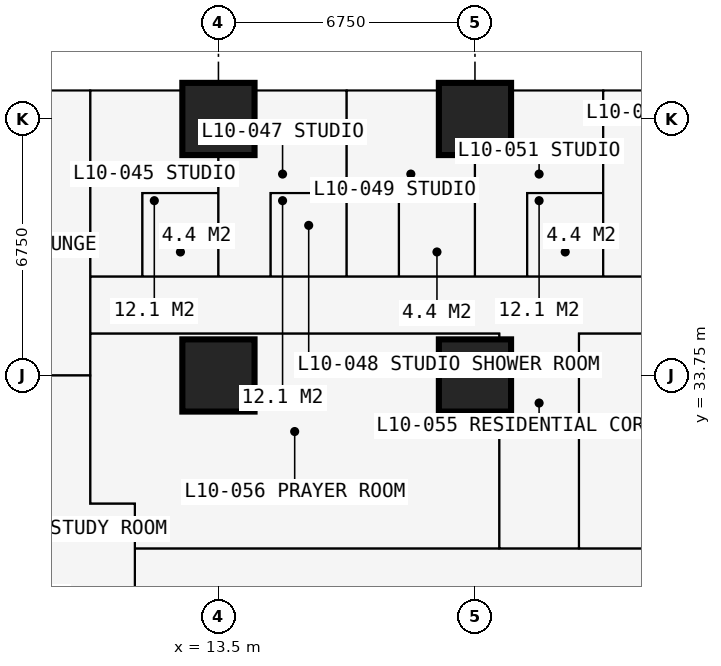
"""IFC4 building model, lengths in metres.
Left out: names, types, materials, properties, quantities, classifications, styles, units other than length and angle.
Written with IfcOpenShell. Run it as: python <this file> out.ifc"""

import sys

from ifc_helpers import new_model, si_unit, direction, frame, frame_2d, origin, origin_2d, place, context, subcontext, project, spatial, rectangle, extrude, element, fill, save


model = new_model("IFC4")
c1 = context("Model", 3, precision=1e-05, world=origin(), true_north=direction((0.0, 1.0)))
c2 = subcontext(c1, "Body", "Model", "MODEL_VIEW")
j1 = project(units=[si_unit("LENGTHUNIT", "METRE"), si_unit("PLANEANGLEUNIT", "RADIAN")], contexts=[c1])
p1 = place(None, origin())
s1 = spatial("IfcSite", under=j1, at=p1, CompositionType="ELEMENT")
p2 = place(p1, origin())
s2 = spatial("IfcBuilding", under=s1, at=p2, CompositionType="ELEMENT")
p3 = place(p2, frame((0.0, 0.0, 39.6)))
s3 = spatial("IfcBuildingStorey", under=s2, at=p3, CompositionType="ELEMENT", Elevation=39.6)
for number, where, z_axis, x_axis in (
    (1, (13.5, 33.75, 0.0), (0.0, 0.0, 1.0), (1.0, 0.0, 0.0)),
    (2, (13.5, 40.5, 0.0), (0.0, 0.0, 1.0), (1.0, 0.0, 0.0)),
    (3, (20.25, 33.75, 0.0), (0.0, 0.0, 1.0), (1.0, 0.0, 0.0)),
    (4, (20.25, 40.5, 0.0), (0.0, 0.0, 1.0), (1.0, 0.0, 0.0)),
):
    element("IfcColumn", number, at=place(p3, frame(where, z_axis=z_axis, x_axis=x_axis)), inside=s3, PredefinedType="COLUMN", context=c2, shape_type="SweptSolid", body=[
        extrude(rectangle(XDim=1.9, YDim=1.9, at=origin_2d()), origin(), (0.0, 0.0, 1.0), 3.6),
    ])
p4 = place(p3, frame((13.5, 41.25, 0.0), z_axis=(0.0, 0.0, 1.0), x_axis=(1.0, 0.0, 0.0)))
e5 = element("IfcWall", 5, at=p4, inside=s3, PredefinedType="SOLIDWALL", context=c2, shape_type="SweptSolid", body=[
    extrude(rectangle(XDim=6.75, YDim=0.15, at=frame_2d((3.375, 0.0))), origin(), (0.0, 0.0, 1.0), 3.375),
])
p5 = place(p4, frame((0.996, 0.0, 0.0)))
e6 = element("IfcOpeningElement", 6, at=p5, cuts=e5, PredefinedType="OPENING", context=c2, shape_type="SweptSolid", body=[
    extrude(rectangle(XDim=1.0, YDim=2.2, at=frame_2d((0.5, 1.1))), frame((0.0, 0.085, 0.0), z_axis=(0.0, -1.0, 0.0), x_axis=(1.0, 0.0, 0.0)), (0.0, 0.0, 1.0), 0.17),
])
p6 = place(p4, frame((2.042, 0.0, 0.9)))
e7 = element("IfcOpeningElement", 7, at=p6, cuts=e5, PredefinedType="OPENING", context=c2, shape_type="SweptSolid", body=[
    extrude(rectangle(XDim=1.2, YDim=1.8, at=frame_2d((0.6, 0.9))), frame((0.0, 0.085, 0.0), z_axis=(0.0, -1.0, 0.0), x_axis=(1.0, 0.0, 0.0)), (0.0, 0.0, 1.0), 0.17),
])
p7 = place(p4, frame((4.754, 0.0, 0.0)))
e8 = element("IfcOpeningElement", 8, at=p7, cuts=e5, PredefinedType="OPENING", context=c2, shape_type="SweptSolid", body=[
    extrude(rectangle(XDim=1.0, YDim=2.2, at=frame_2d((0.5, 1.1))), frame((0.0, 0.085, 0.0), z_axis=(0.0, -1.0, 0.0), x_axis=(1.0, 0.0, 0.0)), (0.0, 0.0, 1.0), 0.17),
])
p8 = place(p4, frame((3.508, 0.0, 0.9)))
e9 = element("IfcOpeningElement", 9, at=p8, cuts=e5, PredefinedType="OPENING", context=c2, shape_type="SweptSolid", body=[
    extrude(rectangle(XDim=1.2, YDim=1.8, at=frame_2d((0.6, 0.9))), frame((0.0, 0.085, 0.0), z_axis=(0.0, -1.0, 0.0), x_axis=(1.0, 0.0, 0.0)), (0.0, 0.0, 1.0), 0.17),
])
p9 = place(p3, frame((16.875, 41.35, 0.0), z_axis=(0.0, 0.0, 1.0), x_axis=(0.0, 1.0, 0.0)))
e10 = element("IfcWall", 10, at=p9, inside=s3, PredefinedType="USERDEFINED", context=c2, shape_type="SweptSolid", body=[
    extrude(rectangle(XDim=2.2, YDim=1.0, at=frame_2d((1.1, 0.0))), origin(), (0.0, 0.0, 1.0), 0.9),
])
p10 = place(p3, frame((4.15, 33.75, 0.0), z_axis=(0.0, 0.0, 1.0), x_axis=(1.0, 0.0, 0.0)))
e11 = element("IfcWall", 11, at=p10, inside=s3, PredefinedType="PARTITIONING", context=c2, shape_type="SweptSolid", body=[
    extrude(rectangle(XDim=5.975, YDim=0.15, at=frame_2d((2.988, 0.0))), origin(), (0.0, 0.0, 1.0), 2.877),
])
p11 = place(p3, frame((10.125, 30.375, 0.0), z_axis=(0.0, 0.0, 1.0), x_axis=(0.0, 1.0, 0.0)))
e12 = element("IfcWall", 12, at=p11, inside=s3, PredefinedType="PARTITIONING", context=c2, shape_type="SweptSolid", body=[
    extrude(rectangle(XDim=10.859, YDim=0.15, at=frame_2d((5.429, 0.0))), origin(), (0.0, 0.0, 1.0), 3.375),
])
p12 = place(p11, frame((4.725, 0.0, 0.0)))
e13 = element("IfcOpeningElement", 13, at=p12, cuts=e12, PredefinedType="OPENING", context=c2, shape_type="SweptSolid", body=[
    extrude(rectangle(XDim=1.0, YDim=2.2, at=frame_2d((0.5, 1.1))), frame((0.0, 0.085, 0.0), z_axis=(0.0, -1.0, 0.0), x_axis=(1.0, 0.0, 0.0)), (0.0, 0.0, 1.0), 0.17),
])
p13 = place(p3, frame((10.125, 30.375, 0.0), z_axis=(0.0, 0.0, 1.0), x_axis=(1.0, 0.0, 0.0)))
e14 = element("IfcWall", 14, at=p13, inside=s3, PredefinedType="PARTITIONING", context=c2, shape_type="SweptSolid", body=[
    extrude(rectangle(XDim=1.175, YDim=0.15, at=frame_2d((0.587, 0.0))), origin(), (0.0, 0.0, 1.0), 3.375),
])
p14 = place(p3, frame((10.125, 34.85, 0.0), z_axis=(0.0, 0.0, 1.0), x_axis=(1.0, 0.0, 0.0)))
e15 = element("IfcWall", 15, at=p14, inside=s3, PredefinedType="PARTITIONING", context=c2, shape_type="SweptSolid", body=[
    extrude(rectangle(XDim=10.762, YDim=0.15, at=frame_2d((5.381, 0.0))), origin(), (0.0, 0.0, 1.0), 3.375),
])
p15 = place(p14, frame((4.9, 0.0, 0.0)))
e16 = element("IfcOpeningElement", 16, at=p15, cuts=e15, PredefinedType="OPENING", context=c2, shape_type="SweptSolid", body=[
    extrude(rectangle(XDim=0.95, YDim=2.2, at=frame_2d((0.475, 1.1))), frame((0.0, 0.085, 0.0), z_axis=(0.0, -1.0, 0.0), x_axis=(1.0, 0.0, 0.0)), (0.0, 0.0, 1.0), 0.17),
])
p16 = place(p3, frame((10.125, 36.35, 0.0), z_axis=(0.0, 0.0, 1.0), x_axis=(1.0, 0.0, 0.0)))
e17 = element("IfcWall", 17, at=p16, inside=s3, PredefinedType="PARTITIONING", context=c2, shape_type="SweptSolid", body=[
    extrude(rectangle(XDim=23.625, YDim=0.1, at=frame_2d((11.812, 0.0))), origin(), (0.0, 0.0, 1.0), 3.375),
])
p17 = place(p16, frame((0.2, 0.0, 0.0)))
e18 = element("IfcOpeningElement", 18, at=p17, cuts=e17, PredefinedType="OPENING", context=c2, shape_type="SweptSolid", body=[
    extrude(rectangle(XDim=0.95, YDim=2.2, at=frame_2d((0.475, 1.1))), frame((0.0, 0.06, 0.0), z_axis=(0.0, -1.0, 0.0), x_axis=(1.0, 0.0, 0.0)), (0.0, 0.0, 1.0), 0.12),
])
p18 = place(p16, frame((3.625, 0.0, 0.0)))
e19 = element("IfcOpeningElement", 19, at=p18, cuts=e17, PredefinedType="OPENING", context=c2, shape_type="SweptSolid", body=[
    extrude(rectangle(XDim=0.95, YDim=2.2, at=frame_2d((0.475, 1.1))), frame((0.0, 0.06, 0.0), z_axis=(0.0, -1.0, 0.0), x_axis=(1.0, 0.0, 0.0)), (0.0, 0.0, 1.0), 0.12),
])
p19 = place(p16, frame((7.0, 0.0, 0.0)))
e20 = element("IfcOpeningElement", 20, at=p19, cuts=e17, PredefinedType="OPENING", context=c2, shape_type="SweptSolid", body=[
    extrude(rectangle(XDim=0.95, YDim=2.2, at=frame_2d((0.475, 1.1))), frame((0.0, 0.06, 0.0), z_axis=(0.0, -1.0, 0.0), x_axis=(1.0, 0.0, 0.0)), (0.0, 0.0, 1.0), 0.12),
])
p20 = place(p16, frame((10.375, 0.0, 0.0)))
e21 = element("IfcOpeningElement", 21, at=p20, cuts=e17, PredefinedType="OPENING", context=c2, shape_type="SweptSolid", body=[
    extrude(rectangle(XDim=0.95, YDim=2.2, at=frame_2d((0.475, 1.1))), frame((0.0, 0.06, 0.0), z_axis=(0.0, -1.0, 0.0), x_axis=(1.0, 0.0, 0.0)), (0.0, 0.0, 1.0), 0.12),
])
p21 = place(p16, frame((13.75, 0.0, 0.0)))
e22 = element("IfcOpeningElement", 22, at=p21, cuts=e17, PredefinedType="OPENING", context=c2, shape_type="SweptSolid", body=[
    extrude(rectangle(XDim=0.95, YDim=2.2, at=frame_2d((0.475, 1.1))), frame((0.0, 0.06, 0.0), z_axis=(0.0, -1.0, 0.0), x_axis=(1.0, 0.0, 0.0)), (0.0, 0.0, 1.0), 0.12),
])
p22 = place(p3, frame((11.3, 11.3, 0.0), z_axis=(0.0, 0.0, 1.0), x_axis=(0.0, 1.0, 0.0)))
e23 = element("IfcWall", 23, at=p22, inside=s3, PredefinedType="PARTITIONING", context=c2, shape_type="SweptSolid", body=[
    extrude(rectangle(XDim=19.075, YDim=0.15, at=frame_2d((9.538, 0.0))), origin(), (0.0, 0.0, 1.0), 3.375),
])
p23 = place(p22, frame((10.137, 0.0, 0.0)))
e24 = element("IfcOpeningElement", 24, at=p23, cuts=e23, PredefinedType="OPENING", context=c2, shape_type="SweptSolid", body=[
    extrude(rectangle(XDim=1.0, YDim=2.2, at=frame_2d((0.5, 1.1))), frame((0.0, 0.085, 0.0), z_axis=(0.0, -1.0, 0.0), x_axis=(1.0, 0.0, 0.0)), (0.0, 0.0, 1.0), 0.17),
])
p24 = place(p3, frame((11.3, 29.2, 0.0), z_axis=(0.0, 0.0, 1.0), x_axis=(1.0, 0.0, 0.0)))
e25 = element("IfcWall", 25, at=p24, inside=s3, PredefinedType="PARTITIONING", context=c2, shape_type="SweptSolid", body=[
    extrude(rectangle(XDim=19.075, YDim=0.15, at=frame_2d((9.538, 0.0))), origin(), (0.0, 0.0, 1.0), 3.375),
])
p25 = place(p24, frame((10.137, 0.0, 0.0)))
e26 = element("IfcOpeningElement", 26, at=p25, cuts=e25, PredefinedType="OPENING", context=c2, shape_type="SweptSolid", body=[
    extrude(rectangle(XDim=1.0, YDim=2.2, at=frame_2d((0.5, 1.1))), frame((0.0, 0.085, 0.0), z_axis=(0.0, -1.0, 0.0), x_axis=(1.0, 0.0, 0.0)), (0.0, 0.0, 1.0), 0.17),
])
p26 = place(p3, frame((11.5, 36.35, 0.0), z_axis=(0.0, 0.0, 1.0), x_axis=(0.0, 1.0, 0.0)))
e27 = element("IfcWall", 27, at=p26, inside=s3, PredefinedType="PARTITIONING", context=c2, shape_type="SweptSolid", body=[
    extrude(rectangle(XDim=2.2, YDim=0.1, at=frame_2d((1.1, 0.0))), origin(), (0.0, 0.0, 1.0), 3.375),
])
p27 = place(p26, frame((0.65, 0.0, 0.0)))
e28 = element("IfcOpeningElement", 28, at=p27, cuts=e27, PredefinedType="OPENING", context=c2, shape_type="SweptSolid", body=[
    extrude(rectangle(XDim=0.9, YDim=2.2, at=frame_2d((0.45, 1.1))), frame((0.0, 0.06, 0.0), z_axis=(0.0, -1.0, 0.0), x_axis=(1.0, 0.0, 0.0)), (0.0, 0.0, 1.0), 0.12),
])
p28 = place(p3, frame((11.5, 38.55, 0.0), z_axis=(0.0, 0.0, 1.0), x_axis=(1.0, 0.0, 0.0)))
e29 = element("IfcWall", 29, at=p28, inside=s3, PredefinedType="PARTITIONING", context=c2, shape_type="SweptSolid", body=[
    extrude(rectangle(XDim=2.0, YDim=0.1, at=frame_2d((1.0, 0.0))), origin(), (0.0, 0.0, 1.0), 3.375),
])
p29 = place(p3, frame((13.5, 36.35, 0.0), z_axis=(0.0, 0.0, 1.0), x_axis=(0.0, 1.0, 0.0)))
e30 = element("IfcWall", 30, at=p29, inside=s3, PredefinedType="PARTITIONING", context=c2, shape_type="SweptSolid", body=[
    extrude(rectangle(XDim=4.884, YDim=0.175, at=frame_2d((2.442, 0.0))), origin(), (0.0, 0.0, 1.0), 2.877),
])
p30 = place(p3, frame((14.875, 36.35, 0.0), z_axis=(0.0, 0.0, 1.0), x_axis=(0.0, 1.0, 0.0)))
e31 = element("IfcWall", 31, at=p30, inside=s3, PredefinedType="PARTITIONING", context=c2, shape_type="SweptSolid", body=[
    extrude(rectangle(XDim=2.2, YDim=0.1, at=frame_2d((1.1, 0.0))), origin(), (0.0, 0.0, 1.0), 3.375),
])
p31 = place(p30, frame((0.65, 0.0, 0.0)))
e32 = element("IfcOpeningElement", 32, at=p31, cuts=e31, PredefinedType="OPENING", context=c2, shape_type="SweptSolid", body=[
    extrude(rectangle(XDim=0.9, YDim=2.2, at=frame_2d((0.45, 1.1))), frame((0.0, 0.06, 0.0), z_axis=(0.0, -1.0, 0.0), x_axis=(1.0, 0.0, 0.0)), (0.0, 0.0, 1.0), 0.12),
])
p32 = place(p3, frame((14.875, 38.55, 0.0), z_axis=(0.0, 0.0, 1.0), x_axis=(1.0, 0.0, 0.0)))
e33 = element("IfcWall", 33, at=p32, inside=s3, PredefinedType="PARTITIONING", context=c2, shape_type="SweptSolid", body=[
    extrude(rectangle(XDim=2.0, YDim=0.1, at=frame_2d((1.0, 0.0))), origin(), (0.0, 0.0, 1.0), 3.375),
])
p33 = place(p3, frame((16.875, 36.35, 0.0), z_axis=(0.0, 0.0, 1.0), x_axis=(0.0, 1.0, 0.0)))
e34 = element("IfcWall", 34, at=p33, inside=s3, PredefinedType="PARTITIONING", context=c2, shape_type="SweptSolid", body=[
    extrude(rectangle(XDim=4.884, YDim=0.175, at=frame_2d((2.442, 0.0))), origin(), (0.0, 0.0, 1.0), 3.375),
])
p34 = place(p3, frame((18.25, 36.35, 0.0), z_axis=(0.0, 0.0, 1.0), x_axis=(0.0, 1.0, 0.0)))
e35 = element("IfcWall", 35, at=p34, inside=s3, PredefinedType="PARTITIONING", context=c2, shape_type="SweptSolid", body=[
    extrude(rectangle(XDim=2.2, YDim=0.1, at=frame_2d((1.1, 0.0))), origin(), (0.0, 0.0, 1.0), 3.375),
])
p35 = place(p34, frame((0.65, 0.0, 0.0)))
e36 = element("IfcOpeningElement", 36, at=p35, cuts=e35, PredefinedType="OPENING", context=c2, shape_type="SweptSolid", body=[
    extrude(rectangle(XDim=0.9, YDim=2.2, at=frame_2d((0.45, 1.1))), frame((0.0, 0.06, 0.0), z_axis=(0.0, -1.0, 0.0), x_axis=(1.0, 0.0, 0.0)), (0.0, 0.0, 1.0), 0.12),
])
p36 = place(p3, frame((18.25, 38.55, 0.0), z_axis=(0.0, 0.0, 1.0), x_axis=(1.0, 0.0, 0.0)))
e37 = element("IfcWall", 37, at=p36, inside=s3, PredefinedType="PARTITIONING", context=c2, shape_type="SweptSolid", body=[
    extrude(rectangle(XDim=2.0, YDim=0.1, at=frame_2d((1.0, 0.0))), origin(), (0.0, 0.0, 1.0), 3.375),
])
p37 = place(p3, frame((20.25, 36.35, 0.0), z_axis=(0.0, 0.0, 1.0), x_axis=(0.0, 1.0, 0.0)))
e38 = element("IfcWall", 38, at=p37, inside=s3, PredefinedType="PARTITIONING", context=c2, shape_type="SweptSolid", body=[
    extrude(rectangle(XDim=4.884, YDim=0.175, at=frame_2d((2.442, 0.0))), origin(), (0.0, 0.0, 1.0), 2.61),
])
p38 = place(p3, frame((20.887, 29.2, 0.0), z_axis=(0.0, 0.0, 1.0), x_axis=(0.0, 1.0, 0.0)))
e39 = element("IfcWall", 39, at=p38, inside=s3, PredefinedType="PARTITIONING", context=c2, shape_type="SweptSolid", body=[
    extrude(rectangle(XDim=5.65, YDim=0.15, at=frame_2d((2.825, 0.0))), origin(), (0.0, 0.0, 1.0), 3.375),
])
p39 = place(p3, frame((21.625, 36.35, 0.0), z_axis=(0.0, 0.0, 1.0), x_axis=(0.0, 1.0, 0.0)))
e40 = element("IfcWall", 40, at=p39, inside=s3, PredefinedType="PARTITIONING", context=c2, shape_type="SweptSolid", body=[
    extrude(rectangle(XDim=2.2, YDim=0.1, at=frame_2d((1.1, 0.0))), origin(), (0.0, 0.0, 1.0), 3.375),
])
p40 = place(p39, frame((0.65, 0.0, 0.0)))
e41 = element("IfcOpeningElement", 41, at=p40, cuts=e40, PredefinedType="OPENING", context=c2, shape_type="SweptSolid", body=[
    extrude(rectangle(XDim=0.9, YDim=2.2, at=frame_2d((0.45, 1.1))), frame((0.0, 0.06, 0.0), z_axis=(0.0, -1.0, 0.0), x_axis=(1.0, 0.0, 0.0)), (0.0, 0.0, 1.0), 0.12),
])
p41 = place(p3, frame((21.625, 38.55, 0.0), z_axis=(0.0, 0.0, 1.0), x_axis=(1.0, 0.0, 0.0)))
e42 = element("IfcWall", 42, at=p41, inside=s3, PredefinedType="PARTITIONING", context=c2, shape_type="SweptSolid", body=[
    extrude(rectangle(XDim=2.0, YDim=0.1, at=frame_2d((1.0, 0.0))), origin(), (0.0, 0.0, 1.0), 3.375),
])
p42 = place(p3, frame((22.988, 34.85, 0.0), z_axis=(0.0, 0.0, 1.0), x_axis=(1.0, 0.0, 0.0)))
e43 = element("IfcWall", 43, at=p42, inside=s3, PredefinedType="PARTITIONING", context=c2, shape_type="SweptSolid", body=[
    extrude(rectangle(XDim=10.762, YDim=0.15, at=frame_2d((5.381, 0.0))), origin(), (0.0, 0.0, 1.0), 3.375),
])
p43 = place(p42, frame((5.0, 0.0, 0.0)))
e44 = element("IfcOpeningElement", 44, at=p43, cuts=e43, PredefinedType="OPENING", context=c2, shape_type="SweptSolid", body=[
    extrude(rectangle(XDim=0.95, YDim=2.2, at=frame_2d((0.475, 1.1))), frame((0.0, 0.085, 0.0), z_axis=(0.0, -1.0, 0.0), x_axis=(1.0, 0.0, 0.0)), (0.0, 0.0, 1.0), 0.17),
])
p44 = place(p3, frame((22.988, 29.2, 0.0), z_axis=(0.0, 0.0, 1.0), x_axis=(0.0, 1.0, 0.0)))
e45 = element("IfcWall", 45, at=p44, inside=s3, PredefinedType="PARTITIONING", context=c2, shape_type="SweptSolid", body=[
    extrude(rectangle(XDim=5.65, YDim=0.15, at=frame_2d((2.825, 0.0))), origin(), (0.0, 0.0, 1.0), 3.375),
])
p45 = place(p3, frame((23.625, 36.35, 0.0), z_axis=(0.0, 0.0, 1.0), x_axis=(0.0, 1.0, 0.0)))
e46 = element("IfcWall", 46, at=p45, inside=s3, PredefinedType="PARTITIONING", context=c2, shape_type="SweptSolid", body=[
    extrude(rectangle(XDim=4.884, YDim=0.175, at=frame_2d((2.442, 0.0))), origin(), (0.0, 0.0, 1.0), 3.375),
])
p46 = place(p5, origin())
e47 = element("IfcDoor", 47, at=p46, inside=s3, OperationType="SINGLE_SWING_LEFT", PredefinedType="DOOR", context=c2, shape_type="SweptSolid", body=[
    extrude(rectangle(XDim=1.0, YDim=2.2, at=frame_2d((0.5, 1.1))), frame((0.0, 0.025, 0.0), z_axis=(0.0, -1.0, 0.0), x_axis=(1.0, 0.0, 0.0)), (0.0, 0.0, 1.0), 0.05),
])
fill(e6, e47)
p47 = place(p6, origin())
e48 = element("IfcWindow", 48, at=p47, inside=s3, PartitioningType="SINGLE_PANEL", PredefinedType="WINDOW", context=c2, shape_type="SweptSolid", body=[
    extrude(rectangle(XDim=1.2, YDim=1.8, at=frame_2d((0.6, 0.9))), frame((0.0, 0.03, 0.0), z_axis=(0.0, -1.0, 0.0), x_axis=(1.0, 0.0, 0.0)), (0.0, 0.0, 1.0), 0.06),
])
fill(e7, e48)
p48 = place(p7, origin())
e49 = element("IfcDoor", 49, at=p48, inside=s3, OperationType="SINGLE_SWING_RIGHT", PredefinedType="DOOR", context=c2, shape_type="SweptSolid", body=[
    extrude(rectangle(XDim=1.0, YDim=2.2, at=frame_2d((0.5, 1.1))), frame((0.0, 0.025, 0.0), z_axis=(0.0, -1.0, 0.0), x_axis=(1.0, 0.0, 0.0)), (0.0, 0.0, 1.0), 0.05),
])
fill(e8, e49)
p49 = place(p8, origin())
e50 = element("IfcWindow", 50, at=p49, inside=s3, PartitioningType="SINGLE_PANEL", PredefinedType="WINDOW", context=c2, shape_type="SweptSolid", body=[
    extrude(rectangle(XDim=1.2, YDim=1.8, at=frame_2d((0.6, 0.9))), frame((0.0, 0.03, 0.0), z_axis=(0.0, -1.0, 0.0), x_axis=(1.0, 0.0, 0.0)), (0.0, 0.0, 1.0), 0.06),
])
fill(e9, e50)
p50 = place(p17, origin())
e51 = element("IfcDoor", 51, at=p50, inside=s3, OperationType="SINGLE_SWING_LEFT", PredefinedType="DOOR", context=c2, shape_type="SweptSolid", body=[
    extrude(rectangle(XDim=0.95, YDim=2.2, at=frame_2d((0.475, 1.1))), frame((0.0, 0.025, 0.0), z_axis=(0.0, -1.0, 0.0), x_axis=(1.0, 0.0, 0.0)), (0.0, 0.0, 1.0), 0.05),
])
fill(e18, e51)
p51 = place(p27, origin())
e52 = element("IfcDoor", 52, at=p51, inside=s3, OperationType="SINGLE_SWING_RIGHT", PredefinedType="DOOR", context=c2, shape_type="SweptSolid", body=[
    extrude(rectangle(XDim=0.9, YDim=2.2, at=frame_2d((0.45, 1.1))), frame((0.0, 0.025, 0.0), z_axis=(0.0, -1.0, 0.0), x_axis=(1.0, 0.0, 0.0)), (0.0, 0.0, 1.0), 0.05),
])
fill(e28, e52)
p52 = place(p18, origin())
e53 = element("IfcDoor", 53, at=p52, inside=s3, OperationType="SINGLE_SWING_LEFT", PredefinedType="DOOR", context=c2, shape_type="SweptSolid", body=[
    extrude(rectangle(XDim=0.95, YDim=2.2, at=frame_2d((0.475, 1.1))), frame((0.0, 0.025, 0.0), z_axis=(0.0, -1.0, 0.0), x_axis=(1.0, 0.0, 0.0)), (0.0, 0.0, 1.0), 0.05),
])
fill(e19, e53)
p53 = place(p31, origin())
e54 = element("IfcDoor", 54, at=p53, inside=s3, OperationType="SINGLE_SWING_RIGHT", PredefinedType="DOOR", context=c2, shape_type="SweptSolid", body=[
    extrude(rectangle(XDim=0.9, YDim=2.2, at=frame_2d((0.45, 1.1))), frame((0.0, 0.025, 0.0), z_axis=(0.0, -1.0, 0.0), x_axis=(1.0, 0.0, 0.0)), (0.0, 0.0, 1.0), 0.05),
])
fill(e32, e54)
p54 = place(p19, origin())
e55 = element("IfcDoor", 55, at=p54, inside=s3, OperationType="SINGLE_SWING_LEFT", PredefinedType="DOOR", context=c2, shape_type="SweptSolid", body=[
    extrude(rectangle(XDim=0.95, YDim=2.2, at=frame_2d((0.475, 1.1))), frame((0.0, 0.025, 0.0), z_axis=(0.0, -1.0, 0.0), x_axis=(1.0, 0.0, 0.0)), (0.0, 0.0, 1.0), 0.05),
])
fill(e20, e55)
p55 = place(p35, origin())
e56 = element("IfcDoor", 56, at=p55, inside=s3, OperationType="SINGLE_SWING_RIGHT", PredefinedType="DOOR", context=c2, shape_type="SweptSolid", body=[
    extrude(rectangle(XDim=0.9, YDim=2.2, at=frame_2d((0.45, 1.1))), frame((0.0, 0.025, 0.0), z_axis=(0.0, -1.0, 0.0), x_axis=(1.0, 0.0, 0.0)), (0.0, 0.0, 1.0), 0.05),
])
fill(e36, e56)
p56 = place(p20, origin())
e57 = element("IfcDoor", 57, at=p56, inside=s3, OperationType="SINGLE_SWING_LEFT", PredefinedType="DOOR", context=c2, shape_type="SweptSolid", body=[
    extrude(rectangle(XDim=0.95, YDim=2.2, at=frame_2d((0.475, 1.1))), frame((0.0, 0.025, 0.0), z_axis=(0.0, -1.0, 0.0), x_axis=(1.0, 0.0, 0.0)), (0.0, 0.0, 1.0), 0.05),
])
fill(e21, e57)
p57 = place(p40, origin())
e58 = element("IfcDoor", 58, at=p57, inside=s3, OperationType="SINGLE_SWING_RIGHT", PredefinedType="DOOR", context=c2, shape_type="SweptSolid", body=[
    extrude(rectangle(XDim=0.9, YDim=2.2, at=frame_2d((0.45, 1.1))), frame((0.0, 0.025, 0.0), z_axis=(0.0, -1.0, 0.0), x_axis=(1.0, 0.0, 0.0)), (0.0, 0.0, 1.0), 0.05),
])
fill(e41, e58)
p58 = place(p21, origin())
e59 = element("IfcDoor", 59, at=p58, inside=s3, OperationType="SINGLE_SWING_LEFT", PredefinedType="DOOR", context=c2, shape_type="SweptSolid", body=[
    extrude(rectangle(XDim=0.95, YDim=2.2, at=frame_2d((0.475, 1.1))), frame((0.0, 0.025, 0.0), z_axis=(0.0, -1.0, 0.0), x_axis=(1.0, 0.0, 0.0)), (0.0, 0.0, 1.0), 0.05),
])
fill(e22, e59)
p59 = place(p25, origin())
e60 = element("IfcDoor", 60, at=p59, inside=s3, OperationType="SINGLE_SWING_LEFT", PredefinedType="DOOR", context=c2, shape_type="SweptSolid", body=[
    extrude(rectangle(XDim=1.0, YDim=2.2, at=frame_2d((0.5, 1.1))), frame((0.0, 0.025, 0.0), z_axis=(0.0, -1.0, 0.0), x_axis=(1.0, 0.0, 0.0)), (0.0, 0.0, 1.0), 0.05),
])
fill(e26, e60)
p60 = place(p15, origin())
e61 = element("IfcDoor", 61, at=p60, inside=s3, OperationType="SINGLE_SWING_LEFT", PredefinedType="DOOR", context=c2, shape_type="SweptSolid", body=[
    extrude(rectangle(XDim=0.95, YDim=2.2, at=frame_2d((0.475, 1.1))), frame((0.0, 0.025, 0.0), z_axis=(0.0, -1.0, 0.0), x_axis=(1.0, 0.0, 0.0)), (0.0, 0.0, 1.0), 0.05),
])
fill(e16, e61)
p61 = place(p12, origin())
e62 = element("IfcDoor", 62, at=p61, inside=s3, OperationType="SINGLE_SWING_LEFT", PredefinedType="DOOR", context=c2, shape_type="SweptSolid", body=[
    extrude(rectangle(XDim=1.0, YDim=2.2, at=frame_2d((0.5, 1.1))), frame((0.0, 0.025, 0.0), z_axis=(0.0, -1.0, 0.0), x_axis=(1.0, 0.0, 0.0)), (0.0, 0.0, 1.0), 0.05),
])
fill(e13, e62)
save(model, sys.argv[1])
